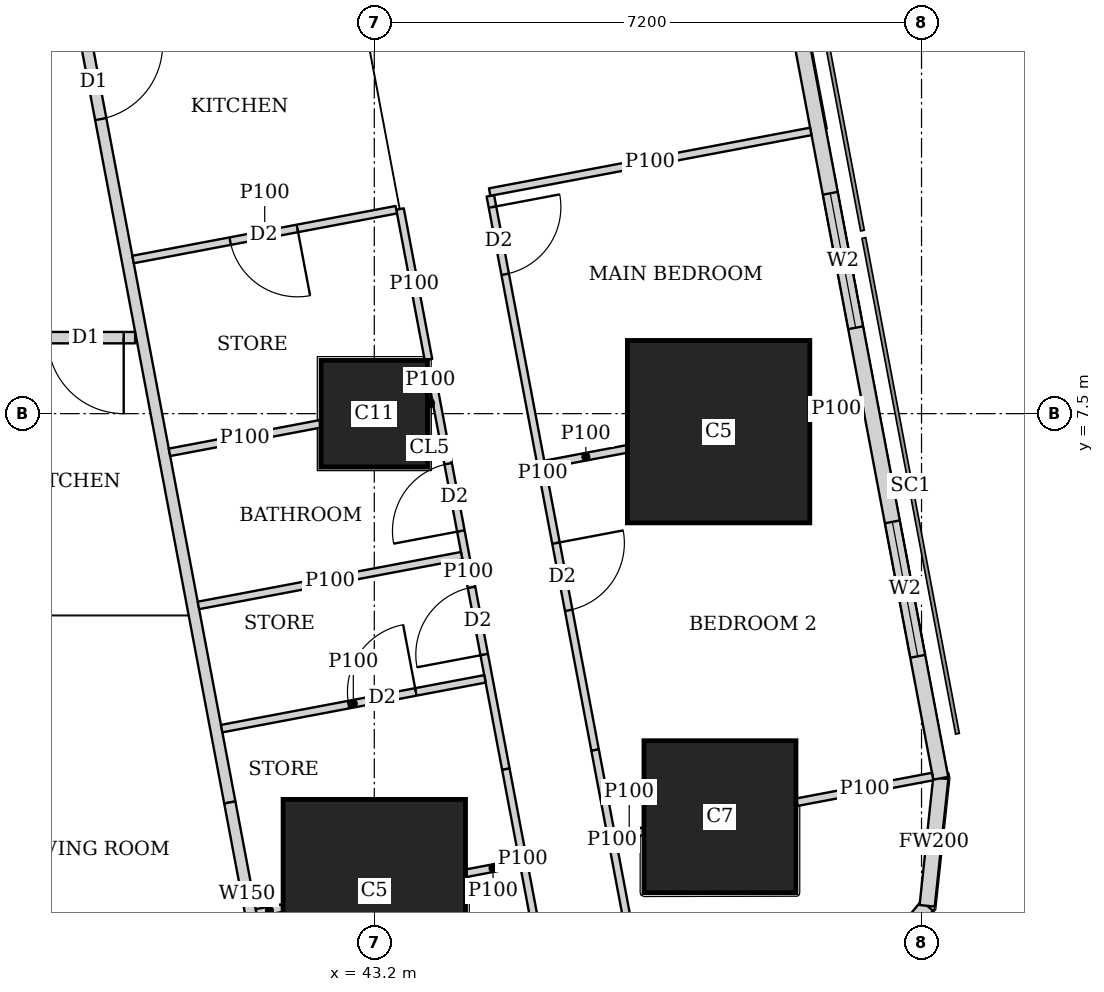
"""IFC4 building model, lengths in metres.
Left out: names, types, materials, properties, quantities, classifications, styles, units other than length and angle.
Written with IfcOpenShell. Run it as: python <this file> out.ifc"""

import sys

from ifc_helpers import new_model, si_unit, direction, frame, frame_2d, origin, origin_2d, place, context, subcontext, project, spatial, rectangle, extrude, element, fill, save


model = new_model("IFC4")
c1 = context("Model", 3, precision=1e-05, world=origin(), true_north=direction((0.0, 1.0)))
c2 = subcontext(c1, "Body", "Model", "MODEL_VIEW")
j1 = project(units=[si_unit("LENGTHUNIT", "METRE"), si_unit("PLANEANGLEUNIT", "RADIAN")], contexts=[c1])
p1 = place(None, origin())
s1 = spatial("IfcSite", under=j1, at=p1, CompositionType="ELEMENT")
p2 = place(p1, origin())
s2 = spatial("IfcBuilding", under=s1, at=p2, CompositionType="ELEMENT")
p3 = place(p2, frame((0.0, 0.0, 212.45)))
s3 = spatial("IfcBuildingStorey", under=s2, at=p3, CompositionType="ELEMENT", Elevation=212.45)
p4 = place(p3, frame((43.2, 1.225, 0.0), z_axis=(0.0, 0.0, 1.0), x_axis=(1.0, 0.0, 0.0)))
e1 = element("IfcColumn", 1, at=p4, inside=s3, PredefinedType="COLUMN", context=c2, shape_type="SweptSolid", body=[
    extrude(rectangle(XDim=2.4, YDim=2.4, at=origin_2d()), origin(), (0.0, 0.0, 1.0), 3.75),
])
p5 = place(p3, frame((47.748, 2.197, 0.0), z_axis=(0.0, 0.0, 1.0), x_axis=(1.0, 0.0, 0.0)))
e2 = element("IfcColumn", 2, at=p5, inside=s3, PredefinedType="COLUMN", context=c2, shape_type="SweptSolid", body=[
    extrude(rectangle(XDim=2.0, YDim=2.0, at=origin_2d()), origin(), (0.0, 0.0, 1.0), 3.75),
])
p6 = place(p3, frame((43.2, 7.5, 0.0), z_axis=(0.0, 0.0, 1.0), x_axis=(1.0, 0.0, 0.0)))
e3 = element("IfcColumn", 3, at=p6, inside=s3, PredefinedType="COLUMN", context=c2, shape_type="SweptSolid", body=[
    extrude(rectangle(XDim=1.4, YDim=1.4, at=origin_2d()), origin(), (0.0, 0.0, 1.0), 3.75),
])
p7 = place(p3, frame((47.73, 7.263, 0.0), z_axis=(0.0, 0.0, 1.0), x_axis=(1.0, 0.0, 0.0)))
e4 = element("IfcColumn", 4, at=p7, inside=s3, PredefinedType="COLUMN", context=c2, shape_type="SweptSolid", body=[
    extrude(rectangle(XDim=2.4, YDim=2.4, at=origin_2d()), origin(), (0.0, 0.0, 1.0), 3.75),
])
p8 = place(p3, frame((49.407, -0.263, 0.0), z_axis=(0.0, 0.0, 1.0), x_axis=(0.638042593423, 0.770001070764, 0.0)))
e5 = element("IfcWall", 5, at=p8, inside=s3, PredefinedType="SOLIDWALL", context=c2, shape_type="SweptSolid", body=[
    extrude(rectangle(XDim=1.673, YDim=0.2, at=frame_2d((0.836, 0.0))), origin(), (0.0, 0.0, 1.0), 3.5),
])
p9 = place(p3, frame((50.474, 1.025, 0.0), z_axis=(0.0, 0.0, 1.0), x_axis=(0.106047815515, 0.994361031429, 0.0)))
e6 = element("IfcWall", 6, at=p9, inside=s3, PredefinedType="SOLIDWALL", context=c2, shape_type="SweptSolid", body=[
    extrude(rectangle(XDim=1.688, YDim=0.2, at=frame_2d((0.844, 0.0))), origin(), (0.0, 0.0, 1.0), 3.5),
])
p10 = place(p3, frame((50.653, 2.703, 0.0), z_axis=(0.0, 0.0, 1.0), x_axis=(-0.185612026696, 0.982623109613, 0.0)))
e7 = element("IfcWall", 7, at=p10, inside=s3, PredefinedType="SOLIDWALL", context=c2, shape_type="SweptSolid", body=[
    extrude(rectangle(XDim=41.393, YDim=0.2, at=frame_2d((20.697, 0.0))), origin(), (0.0, 0.0, 1.0), 3.5),
])
p11 = place(p10, frame((1.633, 0.0, 0.9)))
e8 = element("IfcOpeningElement", 8, at=p11, cuts=e7, PredefinedType="OPENING", context=c2, shape_type="SweptSolid", body=[
    extrude(rectangle(XDim=1.8, YDim=1.5, at=frame_2d((0.9, 0.75))), frame((0.0, 0.11, 0.0), z_axis=(0.0, -1.0, 0.0), x_axis=(1.0, 0.0, 0.0)), (0.0, 0.0, 1.0), 0.22),
])
p12 = place(p10, frame((6.032, 0.0, 0.9)))
e9 = element("IfcOpeningElement", 9, at=p12, cuts=e7, PredefinedType="OPENING", context=c2, shape_type="SweptSolid", body=[
    extrude(rectangle(XDim=1.8, YDim=1.5, at=frame_2d((0.9, 0.75))), frame((0.0, 0.11, 0.0), z_axis=(0.0, -1.0, 0.0), x_axis=(1.0, 0.0, 0.0)), (0.0, 0.0, 1.0), 0.22),
])
p13 = place(p10, frame((9.848, 0.0, 0.9)))
e10 = element("IfcOpeningElement", 10, at=p13, cuts=e7, PredefinedType="OPENING", context=c2, shape_type="SweptSolid", body=[
    extrude(rectangle(XDim=1.8, YDim=1.5, at=frame_2d((0.9, 0.75))), frame((0.0, 0.11, 0.0), z_axis=(0.0, -1.0, 0.0), x_axis=(1.0, 0.0, 0.0)), (0.0, 0.0, 1.0), 0.22),
])
p14 = place(p10, frame((13.664, 0.0, 0.9)))
e11 = element("IfcOpeningElement", 11, at=p14, cuts=e7, PredefinedType="OPENING", context=c2, shape_type="SweptSolid", body=[
    extrude(rectangle(XDim=1.8, YDim=1.5, at=frame_2d((0.9, 0.75))), frame((0.0, 0.11, 0.0), z_axis=(0.0, -1.0, 0.0), x_axis=(1.0, 0.0, 0.0)), (0.0, 0.0, 1.0), 0.22),
])
p15 = place(p10, frame((17.481, 0.0, 0.9)))
e12 = element("IfcOpeningElement", 12, at=p15, cuts=e7, PredefinedType="OPENING", context=c2, shape_type="SweptSolid", body=[
    extrude(rectangle(XDim=1.8, YDim=1.5, at=frame_2d((0.9, 0.75))), frame((0.0, 0.11, 0.0), z_axis=(0.0, -1.0, 0.0), x_axis=(1.0, 0.0, 0.0)), (0.0, 0.0, 1.0), 0.22),
])
p16 = place(p10, frame((21.297, 0.0, 0.9)))
e13 = element("IfcOpeningElement", 13, at=p16, cuts=e7, PredefinedType="OPENING", context=c2, shape_type="SweptSolid", body=[
    extrude(rectangle(XDim=1.8, YDim=1.5, at=frame_2d((0.9, 0.75))), frame((0.0, 0.11, 0.0), z_axis=(0.0, -1.0, 0.0), x_axis=(1.0, 0.0, 0.0)), (0.0, 0.0, 1.0), 0.22),
])
p17 = place(p10, frame((25.113, 0.0, 0.9)))
e14 = element("IfcOpeningElement", 14, at=p17, cuts=e7, PredefinedType="OPENING", context=c2, shape_type="SweptSolid", body=[
    extrude(rectangle(XDim=1.8, YDim=1.5, at=frame_2d((0.9, 0.75))), frame((0.0, 0.11, 0.0), z_axis=(0.0, -1.0, 0.0), x_axis=(1.0, 0.0, 0.0)), (0.0, 0.0, 1.0), 0.22),
])
p18 = place(p10, frame((28.93, 0.0, 0.9)))
e15 = element("IfcOpeningElement", 15, at=p18, cuts=e7, PredefinedType="OPENING", context=c2, shape_type="SweptSolid", body=[
    extrude(rectangle(XDim=1.8, YDim=1.5, at=frame_2d((0.9, 0.75))), frame((0.0, 0.11, 0.0), z_axis=(0.0, -1.0, 0.0), x_axis=(1.0, 0.0, 0.0)), (0.0, 0.0, 1.0), 0.22),
])
p19 = place(p10, frame((32.746, 0.0, 0.9)))
e16 = element("IfcOpeningElement", 16, at=p19, cuts=e7, PredefinedType="OPENING", context=c2, shape_type="SweptSolid", body=[
    extrude(rectangle(XDim=1.8, YDim=1.5, at=frame_2d((0.9, 0.75))), frame((0.0, 0.11, 0.0), z_axis=(0.0, -1.0, 0.0), x_axis=(1.0, 0.0, 0.0)), (0.0, 0.0, 1.0), 0.22),
])
p20 = place(p10, frame((36.481, 0.0, 0.9)))
e17 = element("IfcOpeningElement", 17, at=p20, cuts=e7, PredefinedType="OPENING", context=c2, shape_type="SweptSolid", body=[
    extrude(rectangle(XDim=1.8, YDim=1.5, at=frame_2d((0.9, 0.75))), frame((0.0, 0.11, 0.0), z_axis=(0.0, -1.0, 0.0), x_axis=(1.0, 0.0, 0.0)), (0.0, 0.0, 1.0), 0.22),
])
p21 = place(p3, frame((40.053, 8.5, 0.0), z_axis=(0.0, 0.0, 1.0), x_axis=(-1.0, 0.0, 0.0)))
e18 = element("IfcWall", 18, at=p21, inside=s3, PredefinedType="SOLIDWALL", context=c2, shape_type="SweptSolid", body=[
    extrude(rectangle(XDim=31.052, YDim=0.15, at=frame_2d((15.526, 0.0))), origin(), (0.0, 0.0, 1.0), 3.5),
])
p22 = place(p21, frame((29.178, 0.0, 0.0)))
e19 = element("IfcOpeningElement", 19, at=p22, cuts=e18, PredefinedType="OPENING", context=c2, shape_type="SweptSolid", body=[
    extrude(rectangle(XDim=1.0, YDim=2.1, at=frame_2d((0.5, 1.05))), frame((0.0, 0.085, 0.0), z_axis=(0.0, -1.0, 0.0), x_axis=(1.0, 0.0, 0.0)), (0.0, 0.0, 1.0), 0.17),
])
p23 = place(p21, frame((19.953, 0.0, 0.0)))
e20 = element("IfcOpeningElement", 20, at=p23, cuts=e18, PredefinedType="OPENING", context=c2, shape_type="SweptSolid", body=[
    extrude(rectangle(XDim=1.0, YDim=2.1, at=frame_2d((0.5, 1.05))), frame((0.0, 0.085, 0.0), z_axis=(0.0, -1.0, 0.0), x_axis=(1.0, 0.0, 0.0)), (0.0, 0.0, 1.0), 0.17),
])
p24 = place(p21, frame((12.753, 0.0, 0.0)))
e21 = element("IfcOpeningElement", 21, at=p24, cuts=e18, PredefinedType="OPENING", context=c2, shape_type="SweptSolid", body=[
    extrude(rectangle(XDim=1.0, YDim=2.1, at=frame_2d((0.5, 1.05))), frame((0.0, 0.085, 0.0), z_axis=(0.0, -1.0, 0.0), x_axis=(1.0, 0.0, 0.0)), (0.0, 0.0, 1.0), 0.17),
])
p25 = place(p21, frame((0.15, 0.0, 0.0)))
e22 = element("IfcOpeningElement", 22, at=p25, cuts=e18, PredefinedType="OPENING", context=c2, shape_type="SweptSolid", body=[
    extrude(rectangle(XDim=1.0, YDim=2.1, at=frame_2d((0.5, 1.05))), frame((0.0, 0.085, 0.0), z_axis=(0.0, -1.0, 0.0), x_axis=(1.0, 0.0, 0.0)), (0.0, 0.0, 1.0), 0.17),
])
p26 = place(p3, frame((33.68, 42.723, 0.0), z_axis=(0.0, 0.0, 1.0), x_axis=(0.185601160014, -0.982625162207, 0.0)))
e23 = element("IfcWall", 23, at=p26, inside=s3, PredefinedType="SOLIDWALL", context=c2, shape_type="SweptSolid", body=[
    extrude(rectangle(XDim=41.051, YDim=0.15, at=frame_2d((20.526, 0.0))), origin(), (0.0, 0.0, 1.0), 2.5),
])
p27 = place(p26, frame((12.307, 0.0, 0.0)))
e24 = element("IfcOpeningElement", 24, at=p27, cuts=e23, PredefinedType="OPENING", context=c2, shape_type="SweptSolid", body=[
    extrude(rectangle(XDim=1.0, YDim=2.1, at=frame_2d((0.5, 1.05))), frame((0.0, 0.085, 0.0), z_axis=(0.0, -1.0, 0.0), x_axis=(1.0, 0.0, 0.0)), (0.0, 0.0, 1.0), 0.17),
])
p28 = place(p26, frame((16.123, 0.0, 0.0)))
e25 = element("IfcOpeningElement", 25, at=p28, cuts=e23, PredefinedType="OPENING", context=c2, shape_type="SweptSolid", body=[
    extrude(rectangle(XDim=1.0, YDim=2.1, at=frame_2d((0.5, 1.05))), frame((0.0, 0.085, 0.0), z_axis=(0.0, -1.0, 0.0), x_axis=(1.0, 0.0, 0.0)), (0.0, 0.0, 1.0), 0.17),
])
p29 = place(p26, frame((30.902, 0.0, 0.0)))
e26 = element("IfcOpeningElement", 26, at=p29, cuts=e23, PredefinedType="OPENING", context=c2, shape_type="SweptSolid", body=[
    extrude(rectangle(XDim=1.0, YDim=2.1, at=frame_2d((0.5, 1.05))), frame((0.0, 0.085, 0.0), z_axis=(0.0, -1.0, 0.0), x_axis=(1.0, 0.0, 0.0)), (0.0, 0.0, 1.0), 0.17),
])
p30 = place(p3, frame((41.299, 2.385, 0.0), z_axis=(0.0, 0.0, 1.0), x_axis=(0.18529731833, -0.982682504077, 0.0)))
e27 = element("IfcWall", 27, at=p30, inside=s3, PredefinedType="SOLIDWALL", context=c2, shape_type="SweptSolid", body=[
    extrude(rectangle(XDim=2.455, YDim=0.15, at=frame_2d((1.227, 0.0))), origin(), (0.0, 0.0, 1.0), 2.05),
])
p31 = place(p3, frame((44.727, 10.366, 0.0), z_axis=(0.0, 0.0, 1.0), x_axis=(0.185678775129, -0.982610498858, 0.0)))
e28 = element("IfcWall", 28, at=p31, inside=s3, PredefinedType="PARTITIONING", context=c2, shape_type="SweptSolid", body=[
    extrude(rectangle(XDim=7.421, YDim=0.1, at=frame_2d((3.71, 0.0))), origin(), (0.0, 0.0, 1.0), 3.5),
])
p32 = place(p31, frame((0.151, 0.0, 0.0)))
e29 = element("IfcOpeningElement", 29, at=p32, cuts=e28, PredefinedType="OPENING", context=c2, shape_type="SweptSolid", body=[
    extrude(rectangle(XDim=0.9, YDim=2.1, at=frame_2d((0.45, 1.05))), frame((0.0, 0.06, 0.0), z_axis=(0.0, -1.0, 0.0), x_axis=(1.0, 0.0, 0.0)), (0.0, 0.0, 1.0), 0.12),
])
p33 = place(p31, frame((4.65, 0.0, 0.0)))
e30 = element("IfcOpeningElement", 30, at=p33, cuts=e28, PredefinedType="OPENING", context=c2, shape_type="SweptSolid", body=[
    extrude(rectangle(XDim=0.9, YDim=2.1, at=frame_2d((0.45, 1.05))), frame((0.0, 0.06, 0.0), z_axis=(0.0, -1.0, 0.0), x_axis=(1.0, 0.0, 0.0)), (0.0, 0.0, 1.0), 0.12),
])
p34 = place(p3, frame((46.105, 3.074, 0.0), z_axis=(0.0, 0.0, 1.0), x_axis=(0.185631845838, -0.982619365681, 0.0)))
e31 = element("IfcWall", 31, at=p34, inside=s3, PredefinedType="PARTITIONING", context=c2, shape_type="SweptSolid", body=[
    extrude(rectangle(XDim=2.403, YDim=0.1, at=frame_2d((1.201, 0.0))), origin(), (0.0, 0.0, 1.0), 2.05),
])
p35 = place(p3, frame((43.539, 10.192, 0.0), z_axis=(0.0, 0.0, 1.0), x_axis=(0.185443145218, -0.982654995353, 0.0)))
e32 = element("IfcWall", 32, at=p35, inside=s3, PredefinedType="PARTITIONING", context=c2, shape_type="SweptSolid", body=[
    extrude(rectangle(XDim=2.017, YDim=0.1, at=frame_2d((1.008, 0.0))), origin(), (0.0, 0.0, 1.0), 3.5),
])
p36 = place(p3, frame((43.949, 8.02, 0.0), z_axis=(0.0, 0.0, 1.0), x_axis=(0.185656792073, -0.982614652627, 0.0)))
e33 = element("IfcWall", 33, at=p36, inside=s3, PredefinedType="PARTITIONING", context=c2, shape_type="SweptSolid", body=[
    extrude(rectangle(XDim=5.289, YDim=0.1, at=frame_2d((2.645, 0.0))), origin(), (0.0, 0.0, 1.0), 3.5),
])
p37 = place(p36, frame((1.2, 0.0, 0.0)))
e34 = element("IfcOpeningElement", 34, at=p37, cuts=e33, PredefinedType="OPENING", context=c2, shape_type="SweptSolid", body=[
    extrude(rectangle(XDim=0.9, YDim=2.1, at=frame_2d((0.45, 1.05))), frame((0.0, 0.06, 0.0), z_axis=(0.0, -1.0, 0.0), x_axis=(1.0, 0.0, 0.0)), (0.0, 0.0, 1.0), 0.12),
])
p38 = place(p36, frame((2.855, 0.0, 0.0)))
e35 = element("IfcOpeningElement", 35, at=p38, cuts=e33, PredefinedType="OPENING", context=c2, shape_type="SweptSolid", body=[
    extrude(rectangle(XDim=0.9, YDim=2.1, at=frame_2d((0.45, 1.05))), frame((0.0, 0.06, 0.0), z_axis=(0.0, -1.0, 0.0), x_axis=(1.0, 0.0, 0.0)), (0.0, 0.0, 1.0), 0.12),
])
p39 = place(p3, frame((44.931, 2.823, 0.0), z_axis=(0.0, 0.0, 1.0), x_axis=(0.185631845838, -0.982619365681, 0.0)))
e36 = element("IfcWall", 36, at=p39, inside=s3, PredefinedType="PARTITIONING", context=c2, shape_type="SweptSolid", body=[
    extrude(rectangle(XDim=2.403, YDim=0.1, at=frame_2d((1.201, 0.0))), origin(), (0.0, 0.0, 1.0), 2.05),
])
p40 = place(p3, frame((48.943, 11.213, 0.0), z_axis=(0.0, 0.0, 1.0), x_axis=(-0.982633535512, -0.185556823879, 0.0)))
e37 = element("IfcWall", 37, at=p40, inside=s3, PredefinedType="PARTITIONING", context=c2, shape_type="SweptSolid", body=[
    extrude(rectangle(XDim=4.3, YDim=0.1, at=frame_2d((2.15, 0.0))), origin(), (0.0, 0.0, 1.0), 2.05),
])
p41 = place(p3, frame((49.622, 7.62, 0.0), z_axis=(0.0, 0.0, 1.0), x_axis=(-0.98254419619, -0.186029305578, 0.0)))
e38 = element("IfcWall", 38, at=p41, inside=s3, PredefinedType="PARTITIONING", context=c2, shape_type="SweptSolid", body=[
    extrude(rectangle(XDim=0.694, YDim=0.1, at=frame_2d((0.347, 0.0))), origin(), (0.0, 0.0, 1.0), 3.5),
])
p42 = place(p3, frame((46.52, 7.035, 0.0), z_axis=(0.0, 0.0, 1.0), x_axis=(-0.982620932907, -0.185623549726, 0.0)))
e39 = element("IfcWall", 39, at=p42, inside=s3, PredefinedType="PARTITIONING", context=c2, shape_type="SweptSolid", body=[
    extrude(rectangle(XDim=1.093, YDim=0.1, at=frame_2d((0.546, 0.0))), origin(), (0.0, 0.0, 1.0), 3.5),
])
p43 = place(p3, frame((50.547, 2.726, 0.0), z_axis=(0.0, 0.0, 1.0), x_axis=(-0.982603988143, -0.185713226471, 0.0)))
e40 = element("IfcWall", 40, at=p43, inside=s3, PredefinedType="PARTITIONING", context=c2, shape_type="SweptSolid", body=[
    extrude(rectangle(XDim=1.821, YDim=0.1, at=frame_2d((0.91, 0.0))), origin(), (0.0, 0.0, 1.0), 2.05),
])
p44 = place(p3, frame((46.738, 2.006, 0.0), z_axis=(0.0, 0.0, 1.0), x_axis=(-0.982820466874, -0.184564161994, 0.0)))
e41 = element("IfcWall", 41, at=p44, inside=s3, PredefinedType="PARTITIONING", context=c2, shape_type="SweptSolid", body=[
    extrude(rectangle(XDim=0.374, YDim=0.1, at=frame_2d((0.187, 0.0))), origin(), (0.0, 0.0, 1.0), 2.05),
])
p45 = place(p3, frame((43.49, 10.183, 0.0), z_axis=(0.0, 0.0, 1.0), x_axis=(-0.982588017646, -0.185797706064, 0.0)))
e42 = element("IfcWall", 42, at=p45, inside=s3, PredefinedType="PARTITIONING", context=c2, shape_type="SweptSolid", body=[
    extrude(rectangle(XDim=3.525, YDim=0.1, at=frame_2d((1.763, 0.0))), origin(), (0.0, 0.0, 1.0), 3.5),
])
p46 = place(p45, frame((1.325, 0.0, 0.0)))
e43 = element("IfcOpeningElement", 43, at=p46, cuts=e42, PredefinedType="OPENING", context=c2, shape_type="SweptSolid", body=[
    extrude(rectangle(XDim=0.9, YDim=2.1, at=frame_2d((0.45, 1.05))), frame((0.0, 0.06, 0.0), z_axis=(0.0, -1.0, 0.0), x_axis=(1.0, 0.0, 0.0)), (0.0, 0.0, 1.0), 0.12),
])
p47 = place(p3, frame((43.969, 7.646, 0.0), z_axis=(0.0, 0.0, 1.0), x_axis=(-0.983147034646, -0.182816597351, 0.0)))
e44 = element("IfcWall", 44, at=p47, inside=s3, PredefinedType="PARTITIONING", context=c2, shape_type="SweptSolid", body=[
    extrude(rectangle(XDim=0.06, YDim=0.1, at=frame_2d((0.03, 0.0))), origin(), (0.0, 0.0, 1.0), 3.5),
])
p48 = place(p3, frame((42.49, 7.366, 0.0), z_axis=(0.0, 0.0, 1.0), x_axis=(-0.982620917875, -0.185623629302, 0.0)))
e45 = element("IfcWall", 45, at=p48, inside=s3, PredefinedType="PARTITIONING", context=c2, shape_type="SweptSolid", body=[
    extrude(rectangle(XDim=2.02, YDim=0.1, at=frame_2d((1.01, 0.0))), origin(), (0.0, 0.0, 1.0), 3.5),
])
p49 = place(p3, frame((45.114, 1.587, 0.0), z_axis=(0.0, 0.0, 1.0), x_axis=(-0.982671022916, -0.185358195723, 0.0)))
e46 = element("IfcWall", 46, at=p49, inside=s3, PredefinedType="PARTITIONING", context=c2, shape_type="SweptSolid", body=[
    extrude(rectangle(XDim=0.717, YDim=0.1, at=frame_2d((0.358, 0.0))), origin(), (0.0, 0.0, 1.0), 2.05),
])
p50 = place(p3, frame((41.99, 0.996, 0.0), z_axis=(0.0, 0.0, 1.0), x_axis=(-0.982639822555, -0.185523527159, 0.0)))
e47 = element("IfcWall", 47, at=p50, inside=s3, PredefinedType="PARTITIONING", context=c2, shape_type="SweptSolid", body=[
    extrude(rectangle(XDim=0.346, YDim=0.1, at=frame_2d((0.173, 0.0))), origin(), (0.0, 0.0, 1.0), 2.05),
])
p51 = place(p3, frame((44.35, 5.631, 0.0), z_axis=(0.0, 0.0, 1.0), x_axis=(-0.982638553676, -0.185530247748, 0.0)))
e48 = element("IfcWall", 48, at=p51, inside=s3, PredefinedType="PARTITIONING", context=c2, shape_type="SweptSolid", body=[
    extrude(rectangle(XDim=3.525, YDim=0.1, at=frame_2d((1.763, 0.0))), origin(), (0.0, 0.0, 1.0), 3.5),
])
p52 = place(p3, frame((41.192, 3.356, 0.0), z_axis=(0.0, 0.0, 1.0), x_axis=(0.982588017646, 0.185797706064, 0.0)))
e49 = element("IfcWall", 49, at=p52, inside=s3, PredefinedType="PARTITIONING", context=c2, shape_type="SweptSolid", body=[
    extrude(rectangle(XDim=3.525, YDim=0.1, at=frame_2d((1.763, 0.0))), origin(), (0.0, 0.0, 1.0), 3.5),
])
p53 = place(p52, frame((1.7, 0.0, 0.0)))
e50 = element("IfcOpeningElement", 50, at=p53, cuts=e49, PredefinedType="OPENING", context=c2, shape_type="SweptSolid", body=[
    extrude(rectangle(XDim=0.9, YDim=2.1, at=frame_2d((0.45, 1.05))), frame((0.0, 0.06, 0.0), z_axis=(0.0, -1.0, 0.0), x_axis=(1.0, 0.0, 0.0)), (0.0, 0.0, 1.0), 0.12),
])
p54 = place(p11, origin())
e51 = element("IfcWindow", 51, at=p54, inside=s3, PartitioningType="SINGLE_PANEL", PredefinedType="WINDOW", context=c2, shape_type="SweptSolid", body=[
    extrude(rectangle(XDim=1.8, YDim=1.5, at=frame_2d((0.9, 0.75))), frame((0.0, 0.03, 0.0), z_axis=(0.0, -1.0, 0.0), x_axis=(1.0, 0.0, 0.0)), (0.0, 0.0, 1.0), 0.06),
])
fill(e8, e51)
p55 = place(p12, origin())
e52 = element("IfcWindow", 52, at=p55, inside=s3, PartitioningType="SINGLE_PANEL", PredefinedType="WINDOW", context=c2, shape_type="SweptSolid", body=[
    extrude(rectangle(XDim=1.8, YDim=1.5, at=frame_2d((0.9, 0.75))), frame((0.0, 0.03, 0.0), z_axis=(0.0, -1.0, 0.0), x_axis=(1.0, 0.0, 0.0)), (0.0, 0.0, 1.0), 0.06),
])
fill(e9, e52)
p56 = place(p25, origin())
e53 = element("IfcDoor", 53, at=p56, inside=s3, OperationType="SINGLE_SWING_LEFT", PredefinedType="DOOR", context=c2, shape_type="SweptSolid", body=[
    extrude(rectangle(XDim=1.0, YDim=2.1, at=frame_2d((0.5, 1.05))), frame((0.0, 0.025, 0.0), z_axis=(0.0, -1.0, 0.0), x_axis=(1.0, 0.0, 0.0)), (0.0, 0.0, 1.0), 0.05),
])
fill(e22, e53)
p57 = place(p32, origin())
e54 = element("IfcDoor", 54, at=p57, inside=s3, OperationType="SINGLE_SWING_LEFT", PredefinedType="DOOR", context=c2, shape_type="SweptSolid", body=[
    extrude(rectangle(XDim=0.9, YDim=2.1, at=frame_2d((0.45, 1.05))), frame((0.0, 0.025, 0.0), z_axis=(0.0, -1.0, 0.0), x_axis=(1.0, 0.0, 0.0)), (0.0, 0.0, 1.0), 0.05),
])
fill(e29, e54)
p58 = place(p33, origin())
e55 = element("IfcDoor", 55, at=p58, inside=s3, OperationType="SINGLE_SWING_LEFT", PredefinedType="DOOR", context=c2, shape_type="SweptSolid", body=[
    extrude(rectangle(XDim=0.9, YDim=2.1, at=frame_2d((0.45, 1.05))), frame((0.0, 0.025, 0.0), z_axis=(0.0, -1.0, 0.0), x_axis=(1.0, 0.0, 0.0)), (0.0, 0.0, 1.0), 0.05),
])
fill(e30, e55)
p59 = place(p37, origin())
e56 = element("IfcDoor", 56, at=p59, inside=s3, OperationType="SINGLE_SWING_LEFT", PredefinedType="DOOR", context=c2, shape_type="SweptSolid", body=[
    extrude(rectangle(XDim=0.9, YDim=2.1, at=frame_2d((0.45, 1.05))), frame((0.0, 0.025, 0.0), z_axis=(0.0, -1.0, 0.0), x_axis=(1.0, 0.0, 0.0)), (0.0, 0.0, 1.0), 0.05),
])
fill(e34, e56)
p60 = place(p38, origin())
e57 = element("IfcDoor", 57, at=p60, inside=s3, OperationType="SINGLE_SWING_LEFT", PredefinedType="DOOR", context=c2, shape_type="SweptSolid", body=[
    extrude(rectangle(XDim=0.9, YDim=2.1, at=frame_2d((0.45, 1.05))), frame((0.0, 0.025, 0.0), z_axis=(0.0, -1.0, 0.0), x_axis=(1.0, 0.0, 0.0)), (0.0, 0.0, 1.0), 0.05),
])
fill(e35, e57)
p61 = place(p29, origin())
e58 = element("IfcDoor", 58, at=p61, inside=s3, OperationType="SINGLE_SWING_LEFT", PredefinedType="DOOR", context=c2, shape_type="SweptSolid", body=[
    extrude(rectangle(XDim=1.0, YDim=2.1, at=frame_2d((0.5, 1.05))), frame((0.0, 0.025, 0.0), z_axis=(0.0, -1.0, 0.0), x_axis=(1.0, 0.0, 0.0)), (0.0, 0.0, 1.0), 0.05),
])
fill(e26, e58)
p62 = place(p46, origin())
e59 = element("IfcDoor", 59, at=p62, inside=s3, OperationType="SINGLE_SWING_LEFT", PredefinedType="DOOR", context=c2, shape_type="SweptSolid", body=[
    extrude(rectangle(XDim=0.9, YDim=2.1, at=frame_2d((0.45, 1.05))), frame((0.0, 0.025, 0.0), z_axis=(0.0, -1.0, 0.0), x_axis=(1.0, 0.0, 0.0)), (0.0, 0.0, 1.0), 0.05),
])
fill(e43, e59)
p63 = place(p53, origin())
e60 = element("IfcDoor", 60, at=p63, inside=s3, OperationType="SINGLE_SWING_RIGHT", PredefinedType="DOOR", context=c2, shape_type="SweptSolid", body=[
    extrude(rectangle(XDim=0.9, YDim=2.1, at=frame_2d((0.45, 1.05))), frame((0.0, 0.025, 0.0), z_axis=(0.0, -1.0, 0.0), x_axis=(1.0, 0.0, 0.0)), (0.0, 0.0, 1.0), 0.05),
])
fill(e50, e60)
save(model, sys.argv[1])
